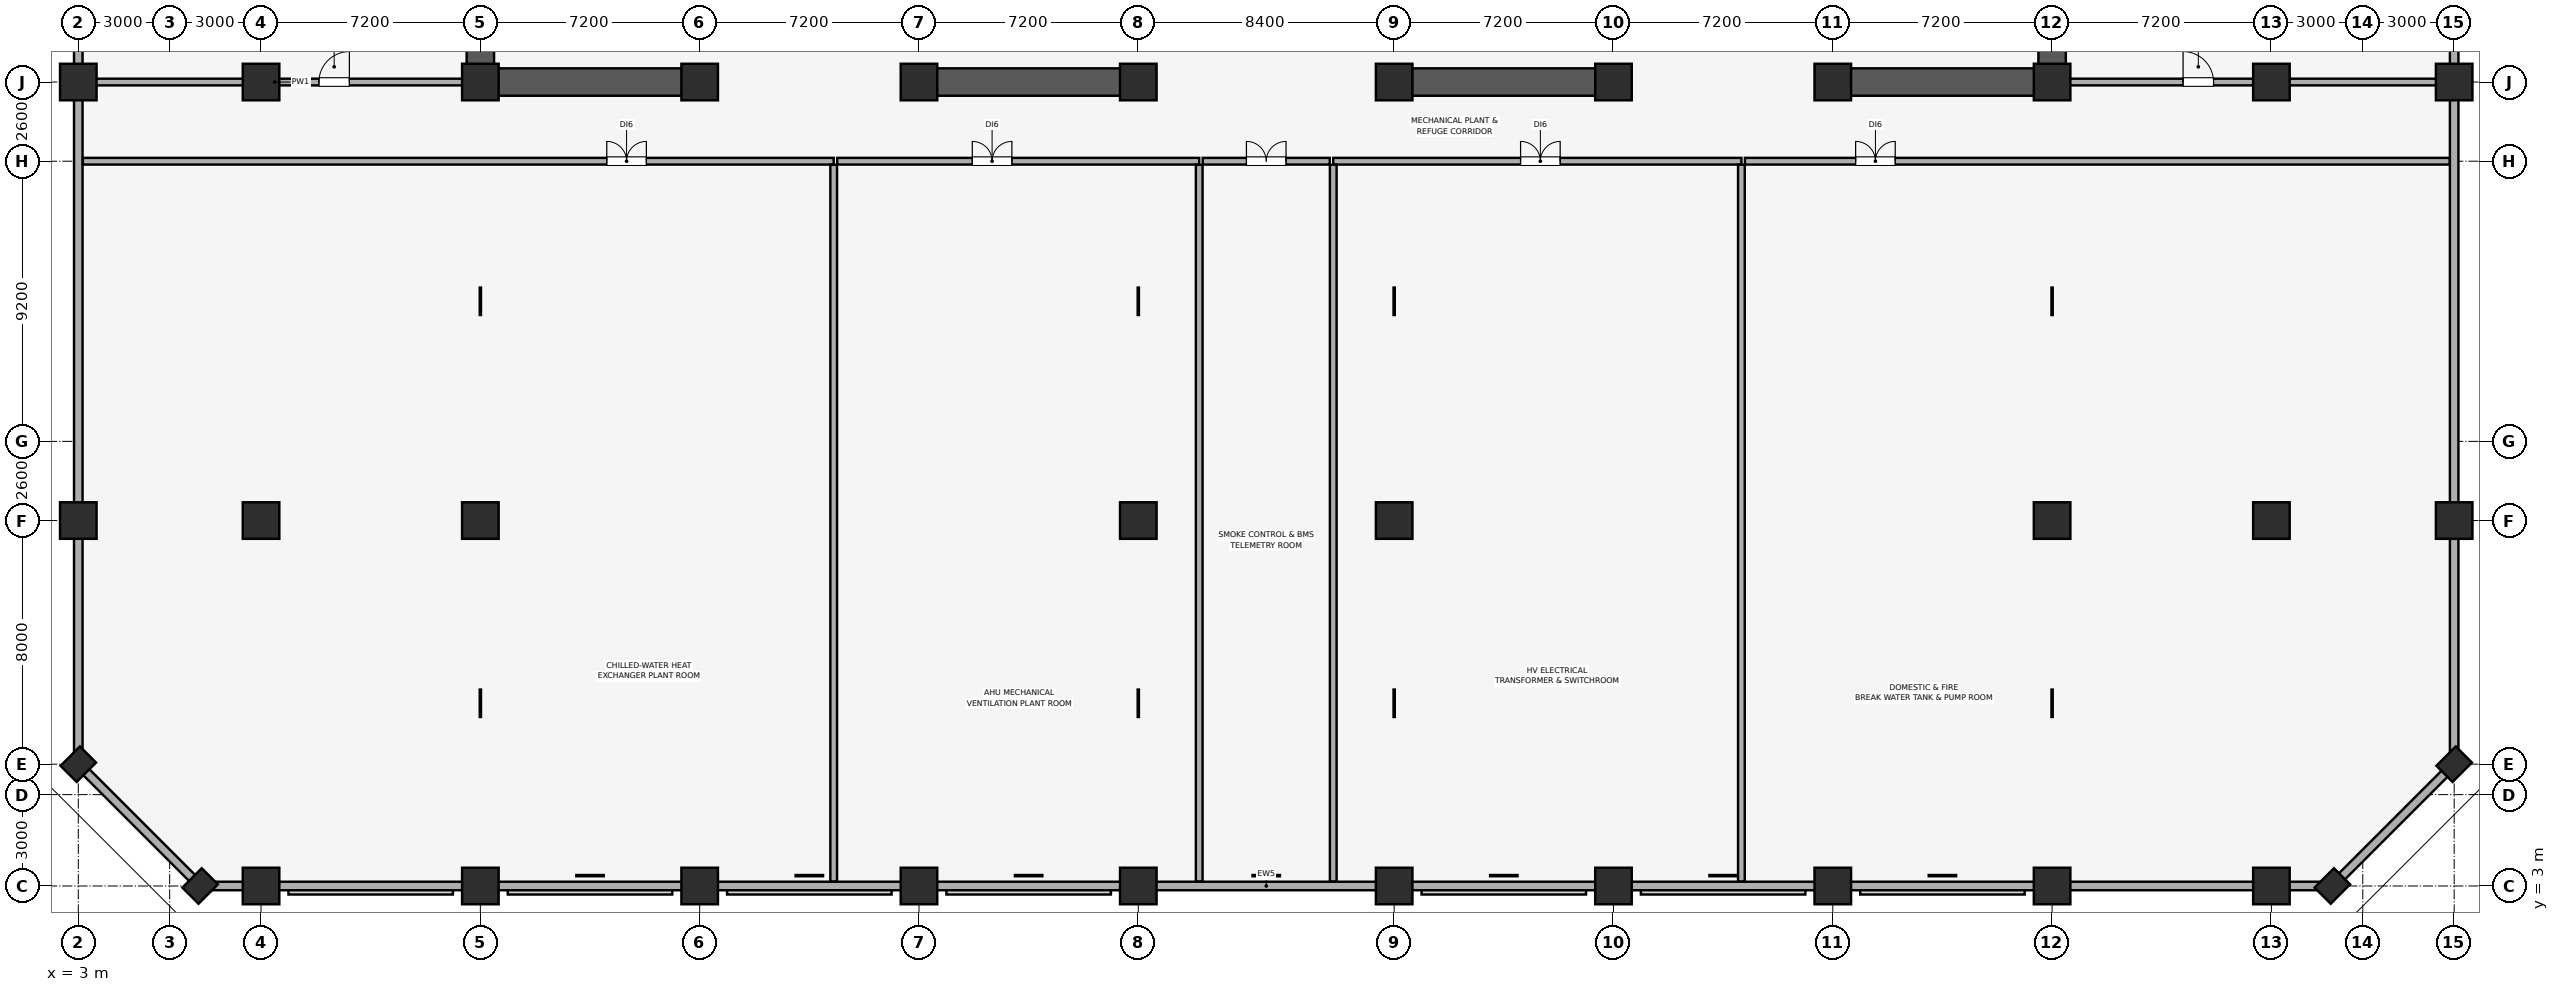
"""IFC4 building model, lengths in metres.
Left out: names, types, materials, properties, quantities, classifications, styles, units other than length and angle.
Written with IfcOpenShell. Run it as: python <this file> out.ifc"""

import sys

from ifc_helpers import new_model, si_unit, direction, frame, frame_2d, origin, origin_2d, place, context, subcontext, project, spatial, rectangle, extrude, element, fill, save


model = new_model("IFC4")
c1 = context("Model", 3, precision=1e-05, world=origin(), true_north=direction((0.0, 1.0)))
c2 = subcontext(c1, "Body", "Model", "MODEL_VIEW")
j1 = project(units=[si_unit("LENGTHUNIT", "METRE"), si_unit("PLANEANGLEUNIT", "RADIAN")], contexts=[c1])
p1 = place(None, origin())
s1 = spatial("IfcSite", under=j1, at=p1, CompositionType="ELEMENT")
p2 = place(p1, origin())
s2 = spatial("IfcBuilding", under=s1, at=p2, CompositionType="ELEMENT")
p3 = place(p2, frame((0.0, 0.0, 184.75)))
s3 = spatial("IfcBuildingStorey", under=s2, at=p3, CompositionType="ELEMENT", Elevation=184.75)
for number, where, z_axis, x_axis in (
    (1, (9.0, 3.0, 0.0), (0.0, 0.0, 1.0), (1.0, 0.0, 0.0)),
    (2, (16.2, 3.0, 0.0), (0.0, 0.0, 1.0), (1.0, 0.0, 0.0)),
    (3, (23.4, 3.0, 0.0), (0.0, 0.0, 1.0), (1.0, 0.0, 0.0)),
    (4, (30.6, 3.0, 0.0), (0.0, 0.0, 1.0), (1.0, 0.0, 0.0)),
    (5, (37.8, 3.0, 0.0), (0.0, 0.0, 1.0), (1.0, 0.0, 0.0)),
    (6, (46.2, 3.0, 0.0), (0.0, 0.0, 1.0), (1.0, 0.0, 0.0)),
    (7, (53.4, 3.0, 0.0), (0.0, 0.0, 1.0), (1.0, 0.0, 0.0)),
    (8, (60.6, 3.0, 0.0), (0.0, 0.0, 1.0), (1.0, 0.0, 0.0)),
    (9, (67.8, 3.0, 0.0), (0.0, 0.0, 1.0), (1.0, 0.0, 0.0)),
    (10, (75.0, 3.0, 0.0), (0.0, 0.0, 1.0), (1.0, 0.0, 0.0)),
    (11, (3.0, 15.0, 0.0), (0.0, 0.0, 1.0), (1.0, 0.0, 0.0)),
    (12, (81.0, 15.0, 0.0), (0.0, 0.0, 1.0), (1.0, 0.0, 0.0)),
    (13, (3.0, 29.4, 0.0), (0.0, 0.0, 1.0), (1.0, 0.0, 0.0)),
    (14, (81.0, 29.4, 0.0), (0.0, 0.0, 1.0), (1.0, 0.0, 0.0)),
):
    element("IfcColumn", number, at=place(p3, frame(where, z_axis=z_axis, x_axis=x_axis)), inside=s3, PredefinedType="COLUMN", context=c2, shape_type="SweptSolid", body=[
        extrude(rectangle(XDim=1.2, YDim=1.2, at=origin_2d()), origin(), (0.0, 0.0, 1.0), 5.16),
    ])
for number, where, z_axis, x_axis in (
    (15, (7.0, 3.0, 0.0), (0.0, 0.0, 1.0), (0.707, 0.707, 0.0)),
    (16, (77.0, 3.0, 0.0), (0.0, 0.0, 1.0), (0.707, 0.707, 0.0)),
    (17, (81.0, 7.0, 0.0), (0.0, 0.0, 1.0), (0.707, 0.707, 0.0)),
    (18, (3.0, 7.0, 0.0), (0.0, 0.0, 1.0), (0.707, 0.707, 0.0)),
):
    element("IfcColumn", number, at=place(p3, frame(where, z_axis=z_axis, x_axis=x_axis)), inside=s3, PredefinedType="PILASTER", context=c2, shape_type="SweptSolid", body=[
        extrude(rectangle(XDim=0.9, YDim=0.75, at=origin_2d()), origin(), (0.0, 0.0, 1.0), 5.16),
    ])
for number, where, z_axis, x_axis in (
    (19, (9.0, 15.0, 0.0), (0.0, 0.0, 1.0), (1.0, 0.0, 0.0)),
    (20, (16.2, 15.0, 0.0), (0.0, 0.0, 1.0), (1.0, 0.0, 0.0)),
    (21, (37.8, 15.0, 0.0), (0.0, 0.0, 1.0), (1.0, 0.0, 0.0)),
    (22, (46.2, 15.0, 0.0), (0.0, 0.0, 1.0), (1.0, 0.0, 0.0)),
    (23, (67.8, 15.0, 0.0), (0.0, 0.0, 1.0), (1.0, 0.0, 0.0)),
    (24, (75.0, 15.0, 0.0), (0.0, 0.0, 1.0), (1.0, 0.0, 0.0)),
    (25, (9.0, 29.4, 0.0), (0.0, 0.0, 1.0), (1.0, 0.0, 0.0)),
    (26, (16.2, 29.4, 0.0), (0.0, 0.0, 1.0), (1.0, 0.0, 0.0)),
    (27, (23.4, 29.4, 0.0), (0.0, 0.0, 1.0), (1.0, 0.0, 0.0)),
    (28, (30.6, 29.4, 0.0), (0.0, 0.0, 1.0), (1.0, 0.0, 0.0)),
    (29, (37.8, 29.4, 0.0), (0.0, 0.0, 1.0), (1.0, 0.0, 0.0)),
    (30, (46.2, 29.4, 0.0), (0.0, 0.0, 1.0), (1.0, 0.0, 0.0)),
    (31, (53.4, 29.4, 0.0), (0.0, 0.0, 1.0), (1.0, 0.0, 0.0)),
    (32, (60.6, 29.4, 0.0), (0.0, 0.0, 1.0), (1.0, 0.0, 0.0)),
    (33, (67.8, 29.4, 0.0), (0.0, 0.0, 1.0), (1.0, 0.0, 0.0)),
    (34, (75.0, 29.4, 0.0), (0.0, 0.0, 1.0), (1.0, 0.0, 0.0)),
):
    element("IfcColumn", number, at=place(p3, frame(where, z_axis=z_axis, x_axis=x_axis)), inside=s3, PredefinedType="COLUMN", context=c2, shape_type="SweptSolid", body=[
        extrude(rectangle(XDim=1.2, YDim=1.2, at=origin_2d()), origin(), (0.0, 0.0, 1.0), 5.16),
    ])
p4 = place(p3, frame((7.0, 3.0, 0.0), z_axis=(0.0, 0.0, 1.0), x_axis=(1.0, 0.0, 0.0)))
e35 = element("IfcWall", 35, at=p4, inside=s3, PredefinedType="SOLIDWALL", context=c2, shape_type="SweptSolid", body=[
    extrude(rectangle(XDim=70.0, YDim=0.28, at=frame_2d((35.0, 0.0))), origin(), (0.0, 0.0, 1.0), 4.36),
])
p5 = place(p3, frame((77.0, 3.0, 0.0), z_axis=(0.0, 0.0, 1.0), x_axis=(0.707106781187, 0.707106781187, 0.0)))
e36 = element("IfcWall", 36, at=p5, inside=s3, PredefinedType="SOLIDWALL", context=c2, shape_type="SweptSolid", body=[
    extrude(rectangle(XDim=5.657, YDim=0.28, at=frame_2d((2.828, 0.0))), origin(), (0.0, 0.0, 1.0), 4.36),
])
for number, where, z_axis, x_axis in (
    (37, (81.0, 7.0, 0.0), (0.0, 0.0, 1.0), (0.0, 1.0, 0.0)),
    (38, (3.0, 45.0, 0.0), (0.0, 0.0, 1.0), (0.0, -1.0, 0.0)),
):
    element("IfcWall", number, at=place(p3, frame(where, z_axis=z_axis, x_axis=x_axis)), inside=s3, PredefinedType="SOLIDWALL", context=c2, shape_type="SweptSolid", body=[
        extrude(rectangle(XDim=38.0, YDim=0.28, at=frame_2d((19.0, 0.0))), origin(), (0.0, 0.0, 1.0), 4.36),
    ])
p6 = place(p3, frame((3.0, 7.0, 0.0), z_axis=(0.0, 0.0, 1.0), x_axis=(0.707106781187, -0.707106781187, 0.0)))
e39 = element("IfcWall", 39, at=p6, inside=s3, PredefinedType="SOLIDWALL", context=c2, shape_type="SweptSolid", body=[
    extrude(rectangle(XDim=5.657, YDim=0.28, at=frame_2d((2.828, 0.0))), origin(), (0.0, 0.0, 1.0), 4.36),
])
for number, where, z_axis, x_axis in (
    (40, (16.2, 29.4, 0.0), (0.0, 0.0, 1.0), (0.0, 1.0, 0.0)),
    (41, (67.8, 29.4, 0.0), (0.0, 0.0, 1.0), (0.0, 1.0, 0.0)),
):
    element("IfcWall", number, at=place(p3, frame(where, z_axis=z_axis, x_axis=x_axis)), inside=s3, PredefinedType="SHEAR", context=c2, shape_type="SweptSolid", body=[
        extrude(rectangle(XDim=19.2, YDim=0.9, at=frame_2d((9.6, 0.0))), origin(), (0.0, 0.0, 1.0), 5.16),
    ])
p7 = place(p3, frame((16.655, 29.4, 0.0), z_axis=(0.0, 0.0, 1.0), x_axis=(1.0, 0.0, 0.0)))
e42 = element("IfcWall", 42, at=p7, inside=s3, PredefinedType="SHEAR", context=c2, shape_type="SweptSolid", body=[
    extrude(rectangle(XDim=6.945, YDim=0.9, at=frame_2d((3.473, 0.0))), origin(), (0.0, 0.0, 1.0), 5.16),
])
for number, where, z_axis, x_axis in (
    (43, (30.4, 29.4, 0.0), (0.0, 0.0, 1.0), (1.0, 0.0, 0.0)),
    (44, (46.0, 29.4, 0.0), (0.0, 0.0, 1.0), (1.0, 0.0, 0.0)),
):
    element("IfcWall", number, at=place(p3, frame(where, z_axis=z_axis, x_axis=x_axis)), inside=s3, PredefinedType="SHEAR", context=c2, shape_type="SweptSolid", body=[
        extrude(rectangle(XDim=7.6, YDim=0.9, at=frame_2d((3.8, 0.0))), origin(), (0.0, 0.0, 1.0), 5.16),
    ])
p8 = place(p3, frame((60.4, 29.4, 0.0), z_axis=(0.0, 0.0, 1.0), x_axis=(1.0, 0.0, 0.0)))
e45 = element("IfcWall", 45, at=p8, inside=s3, PredefinedType="SHEAR", context=c2, shape_type="SweptSolid", body=[
    extrude(rectangle(XDim=6.945, YDim=0.9, at=frame_2d((3.473, 0.0))), origin(), (0.0, 0.0, 1.0), 5.16),
])
p9 = place(p3, frame((3.15, 29.4, 0.0), z_axis=(0.0, 0.0, 1.0), x_axis=(1.0, 0.0, 0.0)))
e46 = element("IfcWall", 46, at=p9, inside=s3, PredefinedType="PARTITIONING", context=c2, shape_type="SweptSolid", body=[
    extrude(rectangle(XDim=12.595, YDim=0.22, at=frame_2d((6.298, 0.0))), origin(), (0.0, 0.0, 1.0), 4.51),
])
p10 = place(p9, frame((7.75, 0.0, 0.0)))
e47 = element("IfcOpeningElement", 47, at=p10, cuts=e46, PredefinedType="OPENING", context=c2, shape_type="SweptSolid", body=[
    extrude(rectangle(XDim=1.0, YDim=2.15, at=frame_2d((0.5, 1.075))), frame((0.0, 0.12, 0.0), z_axis=(0.0, -1.0, 0.0), x_axis=(1.0, 0.0, 0.0)), (0.0, 0.0, 1.0), 0.24),
])
p11 = place(p3, frame((68.255, 29.4, 0.0), z_axis=(0.0, 0.0, 1.0), x_axis=(1.0, 0.0, 0.0)))
e48 = element("IfcWall", 48, at=p11, inside=s3, PredefinedType="PARTITIONING", context=c2, shape_type="SweptSolid", body=[
    extrude(rectangle(XDim=12.595, YDim=0.22, at=frame_2d((6.298, 0.0))), origin(), (0.0, 0.0, 1.0), 4.51),
])
p12 = place(p11, frame((3.845, 0.0, 0.0)))
e49 = element("IfcOpeningElement", 49, at=p12, cuts=e48, PredefinedType="OPENING", context=c2, shape_type="SweptSolid", body=[
    extrude(rectangle(XDim=1.0, YDim=2.15, at=frame_2d((0.5, 1.075))), frame((0.0, 0.12, 0.0), z_axis=(0.0, -1.0, 0.0), x_axis=(1.0, 0.0, 0.0)), (0.0, 0.0, 1.0), 0.24),
])
p13 = place(p3, frame((3.15, 26.8, 0.0), z_axis=(0.0, 0.0, 1.0), x_axis=(1.0, 0.0, 0.0)))
e50 = element("IfcWall", 50, at=p13, inside=s3, PredefinedType="PARTITIONING", context=c2, shape_type="SweptSolid", body=[
    extrude(rectangle(XDim=24.65, YDim=0.22, at=frame_2d((12.325, 0.0))), origin(), (0.0, 0.0, 1.0), 5.16),
])
p14 = place(p13, frame((17.2, 0.0, 0.0)))
e51 = element("IfcOpeningElement", 51, at=p14, cuts=e50, PredefinedType="OPENING", context=c2, shape_type="SweptSolid", body=[
    extrude(rectangle(XDim=1.3, YDim=2.2, at=frame_2d((0.65, 1.1))), frame((0.0, 0.12, 0.0), z_axis=(0.0, -1.0, 0.0), x_axis=(1.0, 0.0, 0.0)), (0.0, 0.0, 1.0), 0.24),
])
p15 = place(p3, frame((27.8, 3.15, 0.0), z_axis=(0.0, 0.0, 1.0), x_axis=(0.0, 1.0, 0.0)))
e52 = element("IfcWall", 52, at=p15, inside=s3, PredefinedType="PARTITIONING", context=c2, shape_type="SweptSolid", body=[
    extrude(rectangle(XDim=23.535, YDim=0.22, at=frame_2d((11.768, 0.0))), origin(), (0.0, 0.0, 1.0), 5.16),
])
p16 = place(p3, frame((27.915, 26.8, 0.0), z_axis=(0.0, 0.0, 1.0), x_axis=(1.0, 0.0, 0.0)))
e53 = element("IfcWall", 53, at=p16, inside=s3, PredefinedType="PARTITIONING", context=c2, shape_type="SweptSolid", body=[
    extrude(rectangle(XDim=11.885, YDim=0.22, at=frame_2d((5.942, 0.0))), origin(), (0.0, 0.0, 1.0), 5.16),
])
p17 = place(p16, frame((4.435, 0.0, 0.0)))
e54 = element("IfcOpeningElement", 54, at=p17, cuts=e53, PredefinedType="OPENING", context=c2, shape_type="SweptSolid", body=[
    extrude(rectangle(XDim=1.3, YDim=2.2, at=frame_2d((0.65, 1.1))), frame((0.0, 0.12, 0.0), z_axis=(0.0, -1.0, 0.0), x_axis=(1.0, 0.0, 0.0)), (0.0, 0.0, 1.0), 0.24),
])
p18 = place(p3, frame((39.8, 3.15, 0.0), z_axis=(0.0, 0.0, 1.0), x_axis=(0.0, 1.0, 0.0)))
e55 = element("IfcWall", 55, at=p18, inside=s3, PredefinedType="PARTITIONING", context=c2, shape_type="SweptSolid", body=[
    extrude(rectangle(XDim=23.535, YDim=0.22, at=frame_2d((11.768, 0.0))), origin(), (0.0, 0.0, 1.0), 5.16),
])
p19 = place(p3, frame((44.2, 26.8, 0.0), z_axis=(0.0, 0.0, 1.0), x_axis=(1.0, 0.0, 0.0)))
e56 = element("IfcWall", 56, at=p19, inside=s3, PredefinedType="PARTITIONING", context=c2, shape_type="SweptSolid", body=[
    extrude(rectangle(XDim=13.4, YDim=0.22, at=frame_2d((6.7, 0.0))), origin(), (0.0, 0.0, 1.0), 5.16),
])
p20 = place(p19, frame((6.15, 0.0, 0.0)))
e57 = element("IfcOpeningElement", 57, at=p20, cuts=e56, PredefinedType="OPENING", context=c2, shape_type="SweptSolid", body=[
    extrude(rectangle(XDim=1.3, YDim=2.2, at=frame_2d((0.65, 1.1))), frame((0.0, 0.12, 0.0), z_axis=(0.0, -1.0, 0.0), x_axis=(1.0, 0.0, 0.0)), (0.0, 0.0, 1.0), 0.24),
])
for number, where, z_axis, x_axis in (
    (58, (44.2, 3.15, 0.0), (0.0, 0.0, 1.0), (0.0, 1.0, 0.0)),
    (59, (57.6, 3.15, 0.0), (0.0, 0.0, 1.0), (0.0, 1.0, 0.0)),
):
    element("IfcWall", number, at=place(p3, frame(where, z_axis=z_axis, x_axis=x_axis)), inside=s3, PredefinedType="PARTITIONING", context=c2, shape_type="SweptSolid", body=[
        extrude(rectangle(XDim=23.535, YDim=0.22, at=frame_2d((11.768, 0.0))), origin(), (0.0, 0.0, 1.0), 5.16),
    ])
p21 = place(p3, frame((57.715, 26.8, 0.0), z_axis=(0.0, 0.0, 1.0), x_axis=(1.0, 0.0, 0.0)))
e60 = element("IfcWall", 60, at=p21, inside=s3, PredefinedType="PARTITIONING", context=c2, shape_type="SweptSolid", body=[
    extrude(rectangle(XDim=23.135, YDim=0.22, at=frame_2d((11.567, 0.0))), origin(), (0.0, 0.0, 1.0), 5.16),
])
p22 = place(p21, frame((3.635, 0.0, 0.0)))
e61 = element("IfcOpeningElement", 61, at=p22, cuts=e60, PredefinedType="OPENING", context=c2, shape_type="SweptSolid", body=[
    extrude(rectangle(XDim=1.3, YDim=2.2, at=frame_2d((0.65, 1.1))), frame((0.0, 0.12, 0.0), z_axis=(0.0, -1.0, 0.0), x_axis=(1.0, 0.0, 0.0)), (0.0, 0.0, 1.0), 0.24),
])
p23 = place(p3, frame((39.915, 26.8, 0.0), z_axis=(0.0, 0.0, 1.0), x_axis=(1.0, 0.0, 0.0)))
e62 = element("IfcWall", 62, at=p23, inside=s3, PredefinedType="PARTITIONING", context=c2, shape_type="SweptSolid", body=[
    extrude(rectangle(XDim=4.17, YDim=0.22, at=frame_2d((2.085, 0.0))), origin(), (0.0, 0.0, 1.0), 5.16),
])
p24 = place(p23, frame((1.435, 0.0, 0.0)))
e63 = element("IfcOpeningElement", 63, at=p24, cuts=e62, PredefinedType="OPENING", context=c2, shape_type="SweptSolid", body=[
    extrude(rectangle(XDim=1.3, YDim=2.2, at=frame_2d((0.65, 1.1))), frame((0.0, 0.12, 0.0), z_axis=(0.0, -1.0, 0.0), x_axis=(1.0, 0.0, 0.0)), (0.0, 0.0, 1.0), 0.24),
])
p25 = place(p10, origin())
e64 = element("IfcDoor", 64, at=p25, inside=s3, OperationType="SINGLE_SWING_RIGHT", PredefinedType="DOOR", context=c2, shape_type="SweptSolid", body=[
    extrude(rectangle(XDim=1.0, YDim=2.15, at=frame_2d((0.5, 1.075))), frame((0.0, 0.025, 0.0), z_axis=(0.0, -1.0, 0.0), x_axis=(1.0, 0.0, 0.0)), (0.0, 0.0, 1.0), 0.05),
])
fill(e47, e64)
p26 = place(p12, origin())
e65 = element("IfcDoor", 65, at=p26, inside=s3, OperationType="SINGLE_SWING_LEFT", PredefinedType="DOOR", context=c2, shape_type="SweptSolid", body=[
    extrude(rectangle(XDim=1.0, YDim=2.15, at=frame_2d((0.5, 1.075))), frame((0.0, 0.025, 0.0), z_axis=(0.0, -1.0, 0.0), x_axis=(1.0, 0.0, 0.0)), (0.0, 0.0, 1.0), 0.05),
])
fill(e49, e65)
p27 = place(p14, origin())
e66 = element("IfcDoor", 66, at=p27, inside=s3, OperationType="DOUBLE_DOOR_SINGLE_SWING", PredefinedType="DOOR", context=c2, shape_type="SweptSolid", body=[
    extrude(rectangle(XDim=1.3, YDim=2.2, at=frame_2d((0.65, 1.1))), frame((0.0, 0.025, 0.0), z_axis=(0.0, -1.0, 0.0), x_axis=(1.0, 0.0, 0.0)), (0.0, 0.0, 1.0), 0.05),
])
fill(e51, e66)
p28 = place(p17, origin())
e67 = element("IfcDoor", 67, at=p28, inside=s3, OperationType="DOUBLE_DOOR_SINGLE_SWING", PredefinedType="DOOR", context=c2, shape_type="SweptSolid", body=[
    extrude(rectangle(XDim=1.3, YDim=2.2, at=frame_2d((0.65, 1.1))), frame((0.0, 0.025, 0.0), z_axis=(0.0, -1.0, 0.0), x_axis=(1.0, 0.0, 0.0)), (0.0, 0.0, 1.0), 0.05),
])
fill(e54, e67)
p29 = place(p20, origin())
e68 = element("IfcDoor", 68, at=p29, inside=s3, OperationType="DOUBLE_DOOR_SINGLE_SWING", PredefinedType="DOOR", context=c2, shape_type="SweptSolid", body=[
    extrude(rectangle(XDim=1.3, YDim=2.2, at=frame_2d((0.65, 1.1))), frame((0.0, 0.025, 0.0), z_axis=(0.0, -1.0, 0.0), x_axis=(1.0, 0.0, 0.0)), (0.0, 0.0, 1.0), 0.05),
])
fill(e57, e68)
p30 = place(p22, origin())
e69 = element("IfcDoor", 69, at=p30, inside=s3, OperationType="DOUBLE_DOOR_SINGLE_SWING", PredefinedType="DOOR", context=c2, shape_type="SweptSolid", body=[
    extrude(rectangle(XDim=1.3, YDim=2.2, at=frame_2d((0.65, 1.1))), frame((0.0, 0.025, 0.0), z_axis=(0.0, -1.0, 0.0), x_axis=(1.0, 0.0, 0.0)), (0.0, 0.0, 1.0), 0.05),
])
fill(e61, e69)
p31 = place(p24, origin())
e70 = element("IfcDoor", 70, at=p31, inside=s3, OperationType="DOUBLE_DOOR_SINGLE_SWING", PredefinedType="DOOR", context=c2, shape_type="SweptSolid", body=[
    extrude(rectangle(XDim=1.3, YDim=2.2, at=frame_2d((0.65, 1.1))), frame((0.0, 0.025, 0.0), z_axis=(0.0, -1.0, 0.0), x_axis=(1.0, 0.0, 0.0)), (0.0, 0.0, 1.0), 0.05),
])
fill(e63, e70)
save(model, sys.argv[1])
